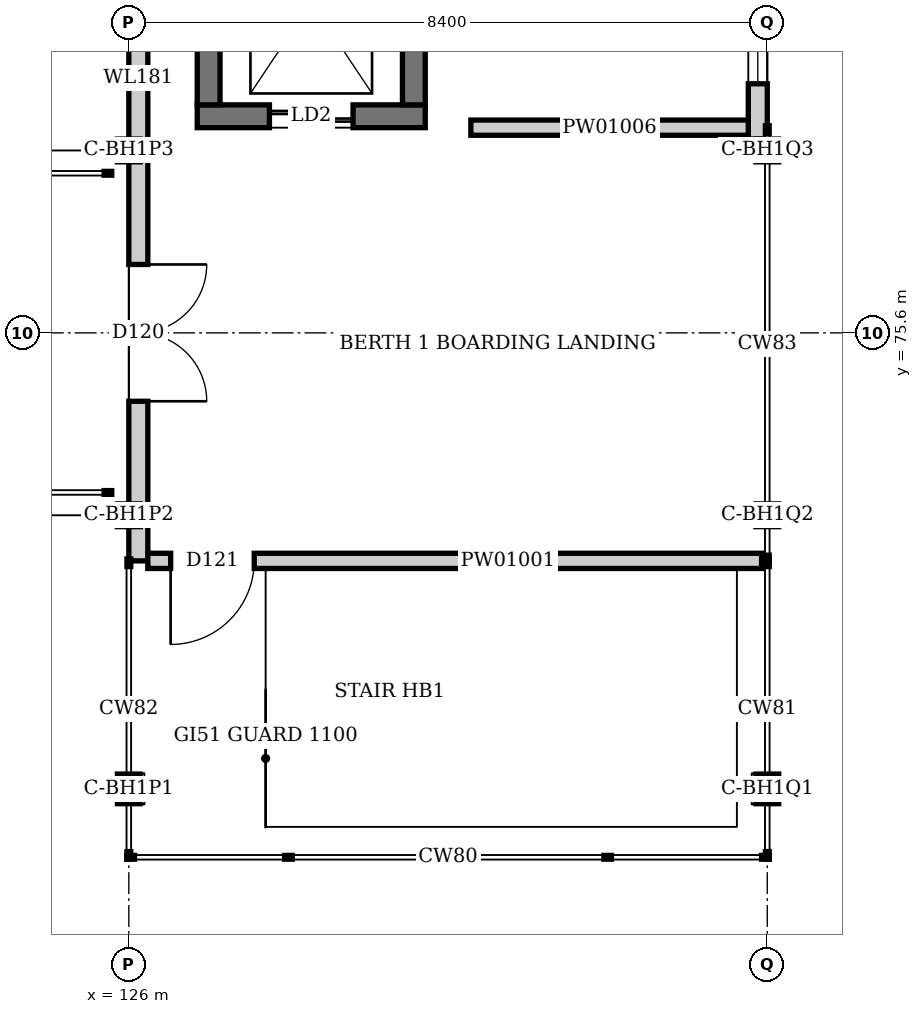
"""IFC4 building model, lengths in metres.
Left out: names, types, materials, properties, quantities, classifications, styles, units other than length and angle.
Written with IfcOpenShell. Run it as: python <this file> out.ifc"""

import sys

from ifc_helpers import new_model, si_unit, direction, frame, frame_2d, origin, origin_2d, place, context, subcontext, project, spatial, rectangle, i_section, extrude, element, fill, save


model = new_model("IFC4")
c1 = context("Model", 3, precision=1e-05, world=origin(), true_north=direction((0.0, 1.0)))
c2 = subcontext(c1, "Body", "Model", "MODEL_VIEW")
j1 = project(units=[si_unit("LENGTHUNIT", "METRE"), si_unit("PLANEANGLEUNIT", "RADIAN")], contexts=[c1])
p1 = place(None, origin())
s1 = spatial("IfcSite", under=j1, at=p1, CompositionType="ELEMENT")
p2 = place(p1, origin())
s2 = spatial("IfcBuilding", under=s1, at=p2, CompositionType="ELEMENT")
p3 = place(p2, frame((0.0, 0.0, 6.0)))
s3 = spatial("IfcBuildingStorey", under=s2, at=p3, CompositionType="ELEMENT", Elevation=6.0)
p4 = place(p3, frame((126.9, 78.45, 0.0), z_axis=(0.0, 0.0, 1.0), x_axis=(1.0, 0.0, 0.0)))
e1 = element("IfcWall", 1, at=p4, inside=s3, PredefinedType="SHEAR", context=c2, shape_type="SweptSolid", body=[
    extrude(rectangle(XDim=3.0, YDim=0.3, at=frame_2d((1.5, 0.0))), origin(), (0.0, 0.0, 1.0), 4.65),
])
p5 = place(p4, frame((0.95, 0.0, 0.0)))
e2 = element("IfcOpeningElement", 2, at=p5, cuts=e1, PredefinedType="OPENING", context=c2, shape_type="SweptSolid", body=[
    extrude(rectangle(XDim=1.1, YDim=2.1, at=frame_2d((0.55, 1.05))), frame((0.0, 0.16, 0.0), z_axis=(0.0, -1.0, 0.0), x_axis=(1.0, 0.0, 0.0)), (0.0, 0.0, 1.0), 0.32),
])
for number, where, z_axis, x_axis in (
    (3, (129.75, 78.6, 0.0), (0.0, 0.0, 1.0), (0.0, 1.0, 0.0)),
    (4, (127.05, 78.6, 0.0), (0.0, 0.0, 1.0), (0.0, 1.0, 0.0)),
):
    element("IfcWall", number, at=place(p3, frame(where, z_axis=z_axis, x_axis=x_axis)), inside=s3, PredefinedType="SHEAR", context=c2, shape_type="SweptSolid", body=[
        extrude(rectangle(XDim=2.7, YDim=0.3, at=frame_2d((1.35, 0.0))), origin(), (0.0, 0.0, 1.0), 4.65),
    ])
p6 = place(p3, frame((126.0, 69.6, 0.0), z_axis=(0.0, 0.0, 1.0), x_axis=(1.0, 0.0, 0.0)))
e5 = element("IfcColumn", 5, at=p6, inside=s3, PredefinedType="COLUMN", context=c2, shape_type="SweptSolid", body=[
    extrude(i_section(OverallWidth=0.3, OverallDepth=0.39, WebThickness=0.011, FlangeThickness=0.019, at=origin_2d()), origin(), (0.0, 0.0, 1.0), 4.8),
])
for number, where, z_axis, x_axis in (
    (6, (126.0, 73.2, 0.0), (0.0, 0.0, 1.0), (1.0, 0.0, 0.0)),
    (7, (126.0, 78.0, 0.0), (0.0, 0.0, 1.0), (1.0, 0.0, 0.0)),
):
    element("IfcColumn", number, at=place(p3, frame(where, z_axis=z_axis, x_axis=x_axis)), inside=s3, PredefinedType="COLUMN", context=c2, shape_type="SweptSolid", body=[
        extrude(i_section(OverallWidth=0.3, OverallDepth=0.3, WebThickness=0.011, FlangeThickness=0.019, at=origin_2d()), origin(), (0.0, 0.0, 1.0), 4.8),
    ])
p7 = place(p3, frame((134.4, 69.6, 0.0), z_axis=(0.0, 0.0, 1.0), x_axis=(1.0, 0.0, 0.0)))
e8 = element("IfcColumn", 8, at=p7, inside=s3, PredefinedType="COLUMN", context=c2, shape_type="SweptSolid", body=[
    extrude(i_section(OverallWidth=0.3, OverallDepth=0.39, WebThickness=0.011, FlangeThickness=0.019, at=origin_2d()), origin(), (0.0, 0.0, 1.0), 4.8),
])
for number, where, z_axis, x_axis in (
    (9, (134.4, 73.2, 0.0), (0.0, 0.0, 1.0), (1.0, 0.0, 0.0)),
    (10, (134.4, 78.0, 0.0), (0.0, 0.0, 1.0), (1.0, 0.0, 0.0)),
):
    element("IfcColumn", number, at=place(p3, frame(where, z_axis=z_axis, x_axis=x_axis)), inside=s3, PredefinedType="COLUMN", context=c2, shape_type="SweptSolid", body=[
        extrude(i_section(OverallWidth=0.3, OverallDepth=0.3, WebThickness=0.011, FlangeThickness=0.019, at=origin_2d()), origin(), (0.0, 0.0, 1.0), 4.8),
    ])
p8 = place(p3, frame((134.275, 78.15, 0.0), z_axis=(0.0, 0.0, 1.0), x_axis=(0.0, 1.0, 0.0)))
e11 = element("IfcWall", 11, at=p8, inside=s3, PredefinedType="SOLIDWALL", context=c2, shape_type="SweptSolid", body=[
    extrude(rectangle(XDim=3.255, YDim=0.25, at=frame_2d((1.627, 0.0))), origin(), (0.0, 0.0, 1.0), 4.6),
])
p9 = place(p8, frame((0.728, 0.0, 0.9)))
e12 = element("IfcOpeningElement", 12, at=p9, cuts=e11, PredefinedType="OPENING", context=c2, shape_type="SweptSolid", body=[
    extrude(rectangle(XDim=1.8, YDim=1.8, at=frame_2d((0.9, 0.9))), frame((0.0, 0.135, 0.0), z_axis=(0.0, -1.0, 0.0), x_axis=(1.0, 0.0, 0.0)), (0.0, 0.0, 1.0), 0.27),
])
p10 = place(p3, frame((126.125, 72.6, 0.0), z_axis=(0.0, 0.0, 1.0), x_axis=(0.0, 1.0, 0.0)))
e13 = element("IfcWall", 13, at=p10, inside=s3, PredefinedType="SOLIDWALL", context=c2, shape_type="SweptSolid", body=[
    extrude(rectangle(XDim=8.805, YDim=0.25, at=frame_2d((4.402, 0.0))), origin(), (0.0, 0.0, 1.0), 4.6),
])
p11 = place(p10, frame((2.1, 0.0, 0.0)))
e14 = element("IfcOpeningElement", 14, at=p11, cuts=e13, PredefinedType="OPENING", context=c2, shape_type="SweptSolid", body=[
    extrude(rectangle(XDim=1.8, YDim=2.0, at=frame_2d((0.9, 1.0))), frame((0.0, 0.135, 0.0), z_axis=(0.0, -1.0, 0.0), x_axis=(1.0, 0.0, 0.0)), (0.0, 0.0, 1.0), 0.27),
])
p12 = place(p3, frame((126.25, 72.6, 0.0), z_axis=(0.0, 0.0, 1.0), x_axis=(1.0, 0.0, 0.0)))
e15 = element("IfcWall", 15, at=p12, inside=s3, PredefinedType="PARTITIONING", context=c2, shape_type="SweptSolid", body=[
    extrude(rectangle(XDim=8.075, YDim=0.2, at=frame_2d((4.038, 0.0))), origin(), (0.0, 0.0, 1.0), 4.6),
])
p13 = place(p12, frame((0.3, 0.0, 0.0)))
e16 = element("IfcOpeningElement", 16, at=p13, cuts=e15, PredefinedType="OPENING", context=c2, shape_type="SweptSolid", body=[
    extrude(rectangle(XDim=1.1, YDim=2.4, at=frame_2d((0.55, 1.2))), frame((0.0, 0.11, 0.0), z_axis=(0.0, -1.0, 0.0), x_axis=(1.0, 0.0, 0.0)), (0.0, 0.0, 1.0), 0.22),
])
p14 = place(p3, frame((130.5, 78.3, 0.0), z_axis=(0.0, 0.0, 1.0), x_axis=(1.0, 0.0, 0.0)))
e17 = element("IfcWall", 17, at=p14, inside=s3, PredefinedType="PARTITIONING", context=c2, shape_type="SweptSolid", body=[
    extrude(rectangle(XDim=3.65, YDim=0.2, at=frame_2d((1.825, 0.0))), origin(), (0.0, 0.0, 1.0), 4.6),
])
p15 = place(p9, origin())
e18 = element("IfcWindow", 18, at=p15, inside=s3, PartitioningType="SINGLE_PANEL", PredefinedType="WINDOW", context=c2, shape_type="SweptSolid", body=[
    extrude(rectangle(XDim=1.8, YDim=1.8, at=frame_2d((0.9, 0.9))), frame((0.0, 0.03, 0.0), z_axis=(0.0, -1.0, 0.0), x_axis=(1.0, 0.0, 0.0)), (0.0, 0.0, 1.0), 0.06),
])
fill(e12, e18)
p16 = place(p11, frame((1.8, 0.0, 0.0), z_axis=(0.0, 0.0, 1.0), x_axis=(-1.0, 0.0, 0.0)))
e19 = element("IfcDoor", 19, at=p16, inside=s3, OperationType="DOUBLE_DOOR_SINGLE_SWING", PredefinedType="DOOR", context=c2, shape_type="SweptSolid", body=[
    extrude(rectangle(XDim=1.8, YDim=2.0, at=frame_2d((0.9, 1.0))), frame((0.0, 0.025, 0.0), z_axis=(0.0, -1.0, 0.0), x_axis=(1.0, 0.0, 0.0)), (0.0, 0.0, 1.0), 0.05),
])
fill(e14, e19)
p17 = place(p13, frame((1.1, 0.0, 0.0), z_axis=(0.0, 0.0, 1.0), x_axis=(-1.0, 0.0, 0.0)))
e20 = element("IfcDoor", 20, at=p17, inside=s3, OperationType="SINGLE_SWING_RIGHT", PredefinedType="DOOR", context=c2, shape_type="SweptSolid", body=[
    extrude(rectangle(XDim=1.1, YDim=2.4, at=frame_2d((0.55, 1.2))), frame((0.0, 0.025, 0.0), z_axis=(0.0, -1.0, 0.0), x_axis=(1.0, 0.0, 0.0)), (0.0, 0.0, 1.0), 0.05),
])
fill(e16, e20)
p18 = place(p5, origin())
e21 = element("IfcDoor", 21, at=p18, inside=s3, OperationType="SLIDING_TO_LEFT", PredefinedType="DOOR", context=c2, shape_type="SweptSolid", body=[
    extrude(rectangle(XDim=1.1, YDim=2.1, at=frame_2d((0.55, 1.05))), frame((0.0, 0.025, 0.0), z_axis=(0.0, -1.0, 0.0), x_axis=(1.0, 0.0, 0.0)), (0.0, 0.0, 1.0), 0.05),
])
fill(e2, e21)
save(model, sys.argv[1])
